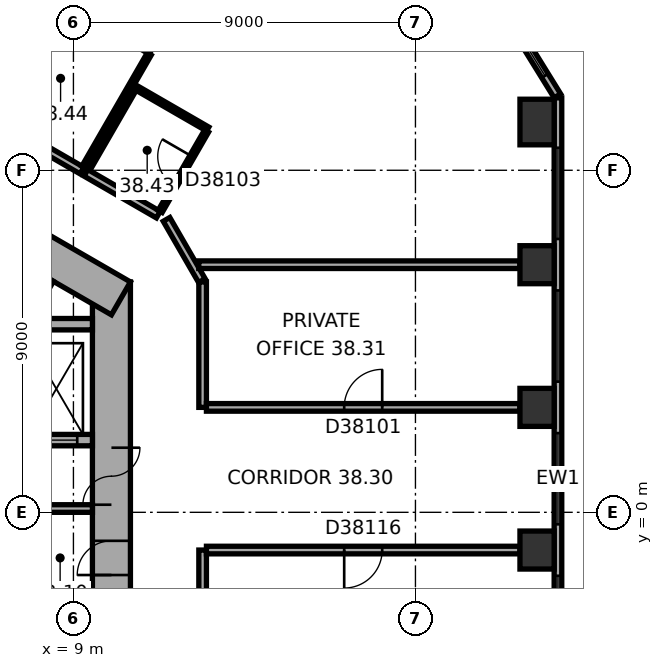
"""IFC4 building model, lengths in metres.
Left out: names, types, materials, properties, quantities, classifications, styles, units other than length and angle.
Written with IfcOpenShell. Run it as: python <this file> out.ifc"""

import sys

from ifc_helpers import new_model, si_unit, direction, frame, frame_2d, origin, origin_2d, place, context, subcontext, project, spatial, rectangle, extrude, element, fill, save


model = new_model("IFC4")
c1 = context("Model", 3, precision=1e-05, world=origin(), true_north=direction((0.0, 1.0)))
c2 = subcontext(c1, "Body", "Model", "MODEL_VIEW")
j1 = project(units=[si_unit("LENGTHUNIT", "METRE"), si_unit("PLANEANGLEUNIT", "RADIAN")], contexts=[c1])
p1 = place(None, origin())
s1 = spatial("IfcSite", under=j1, at=p1, CompositionType="ELEMENT")
p2 = place(p1, origin())
s2 = spatial("IfcBuilding", under=s1, at=p2, CompositionType="ELEMENT")
p3 = place(p2, frame((0.0, 0.0, 157.7)))
s3 = spatial("IfcBuildingStorey", under=s2, at=p3, CompositionType="ELEMENT", Elevation=157.7)
for number, where, z_axis, x_axis in (
    (1, (21.2, -0.993, 0.0), (0.0, 0.0, 1.0), (0.0, 1.0, 0.0)),
    (2, (21.2, 2.761, 0.0), (0.0, 0.0, 1.0), (0.0, 1.0, 0.0)),
    (3, (21.2, 6.515, 0.0), (0.0, 0.0, 1.0), (0.0, 1.0, 0.0)),
):
    element("IfcColumn", number, at=place(p3, frame(where, z_axis=z_axis, x_axis=x_axis)), inside=s3, PredefinedType="COLUMN", context=c2, shape_type="SweptSolid", body=[
        extrude(rectangle(XDim=1.0, YDim=0.9, at=origin_2d()), origin(), (0.0, 0.0, 1.0), 3.7),
    ])
p4 = place(p3, frame((21.2, 10.27, 0.0), z_axis=(0.0, 0.0, 1.0), x_axis=(0.0, 1.0, 0.0)))
e4 = element("IfcColumn", 4, at=p4, inside=s3, PredefinedType="COLUMN", context=c2, shape_type="SweptSolid", body=[
    extrude(rectangle(XDim=1.2, YDim=0.9, at=origin_2d()), origin(), (0.0, 0.0, 1.0), 3.7),
])
p5 = place(p3, frame((10.0, -6.062, 0.0), z_axis=(0.0, 0.0, 1.0), x_axis=(0.0, 1.0, 0.0)))
e5 = element("IfcWall", 5, at=p5, inside=s3, PredefinedType="SHEAR", context=c2, shape_type="SweptSolid", body=[
    extrude(rectangle(XDim=12.125, YDim=1.0, at=frame_2d((6.062, 0.0))), origin(), (0.0, 0.0, 1.0), 3.7),
])
p6 = place(p5, frame((6.262, 0.0, 0.0)))
e6 = element("IfcOpeningElement", 6, at=p6, cuts=e5, PredefinedType="OPENING", context=c2, shape_type="SweptSolid", body=[
    extrude(rectangle(XDim=1.5, YDim=2.1, at=frame_2d((0.75, 1.05))), frame((0.0, 0.51, 0.0), z_axis=(0.0, -1.0, 0.0), x_axis=(1.0, 0.0, 0.0)), (0.0, 0.0, 1.0), 1.02),
])
p7 = place(p5, frame((1.812, 0.0, 0.0)))
e7 = element("IfcOpeningElement", 7, at=p7, cuts=e5, PredefinedType="OPENING", context=c2, shape_type="SweptSolid", body=[
    extrude(rectangle(XDim=0.9, YDim=2.1, at=frame_2d((0.45, 1.05))), frame((0.0, 0.51, 0.0), z_axis=(0.0, -1.0, 0.0), x_axis=(1.0, 0.0, 0.0)), (0.0, 0.0, 1.0), 1.02),
])
p8 = place(p5, frame((4.412, 0.0, 0.0)))
e8 = element("IfcOpeningElement", 8, at=p8, cuts=e5, PredefinedType="OPENING", context=c2, shape_type="SweptSolid", body=[
    extrude(rectangle(XDim=0.9, YDim=2.1, at=frame_2d((0.45, 1.05))), frame((0.0, 0.51, 0.0), z_axis=(0.0, -1.0, 0.0), x_axis=(1.0, 0.0, 0.0)), (0.0, 0.0, 1.0), 1.02),
])
p9 = place(p3, frame((10.25, 5.629, 0.0), z_axis=(0.0, 0.0, 1.0), x_axis=(-0.866022616891, 0.50000482701, 0.0)))
e9 = element("IfcWall", 9, at=p9, inside=s3, PredefinedType="SHEAR", context=c2, shape_type="SweptSolid", body=[
    extrude(rectangle(XDim=12.125, YDim=1.0, at=frame_2d((6.062, 0.0))), origin(), (0.0, 0.0, 1.0), 3.7),
])
p10 = place(p9, frame((2.712, 0.0, 0.0)))
e10 = element("IfcOpeningElement", 10, at=p10, cuts=e9, PredefinedType="OPENING", context=c2, shape_type="SweptSolid", body=[
    extrude(rectangle(XDim=0.9, YDim=2.1, at=frame_2d((0.45, 1.05))), frame((0.0, 0.51, 0.0), z_axis=(0.0, -1.0, 0.0), x_axis=(1.0, 0.0, 0.0)), (0.0, 0.0, 1.0), 1.02),
])
p11 = place(p9, frame((6.612, 0.0, 0.0)))
e11 = element("IfcOpeningElement", 11, at=p11, cuts=e9, PredefinedType="OPENING", context=c2, shape_type="SweptSolid", body=[
    extrude(rectangle(XDim=0.9, YDim=2.1, at=frame_2d((0.45, 1.05))), frame((0.0, 0.51, 0.0), z_axis=(0.0, -1.0, 0.0), x_axis=(1.0, 0.0, 0.0)), (0.0, 0.0, 1.0), 1.02),
])
p12 = place(p3, frame((21.75, -9.138, 0.0), z_axis=(0.0, 0.0, 1.0), x_axis=(0.0, 1.0, 0.0)))
e12 = element("IfcWall", 12, at=p12, inside=s3, PredefinedType="STANDARD", context=c2, shape_type="SweptSolid", body=[
    extrude(rectangle(XDim=20.044, YDim=0.2, at=frame_2d((10.022, 0.0))), origin(), (0.0, 0.0, 1.0), 3.7),
])
p13 = place(p12, frame((1.314, 0.0, 0.9)))
e13 = element("IfcOpeningElement", 13, at=p13, cuts=e12, PredefinedType="OPENING", context=c2, shape_type="SweptSolid", body=[
    extrude(rectangle(XDim=2.4, YDim=2.0, at=frame_2d((1.2, 1.0))), frame((0.0, 0.11, 0.0), z_axis=(0.0, -1.0, 0.0), x_axis=(1.0, 0.0, 0.0)), (0.0, 0.0, 1.0), 0.22),
])
p14 = place(p12, frame((5.069, 0.0, 0.9)))
e14 = element("IfcOpeningElement", 14, at=p14, cuts=e12, PredefinedType="OPENING", context=c2, shape_type="SweptSolid", body=[
    extrude(rectangle(XDim=2.4, YDim=2.0, at=frame_2d((1.2, 1.0))), frame((0.0, 0.11, 0.0), z_axis=(0.0, -1.0, 0.0), x_axis=(1.0, 0.0, 0.0)), (0.0, 0.0, 1.0), 0.22),
])
p15 = place(p12, frame((8.823, 0.0, 0.9)))
e15 = element("IfcOpeningElement", 15, at=p15, cuts=e12, PredefinedType="OPENING", context=c2, shape_type="SweptSolid", body=[
    extrude(rectangle(XDim=2.4, YDim=2.0, at=frame_2d((1.2, 1.0))), frame((0.0, 0.11, 0.0), z_axis=(0.0, -1.0, 0.0), x_axis=(1.0, 0.0, 0.0)), (0.0, 0.0, 1.0), 0.22),
])
p16 = place(p12, frame((12.577, 0.0, 0.9)))
e16 = element("IfcOpeningElement", 16, at=p16, cuts=e12, PredefinedType="OPENING", context=c2, shape_type="SweptSolid", body=[
    extrude(rectangle(XDim=2.4, YDim=2.0, at=frame_2d((1.2, 1.0))), frame((0.0, 0.11, 0.0), z_axis=(0.0, -1.0, 0.0), x_axis=(1.0, 0.0, 0.0)), (0.0, 0.0, 1.0), 0.22),
])
p17 = place(p12, frame((16.331, 0.0, 0.9)))
e17 = element("IfcOpeningElement", 17, at=p17, cuts=e12, PredefinedType="OPENING", context=c2, shape_type="SweptSolid", body=[
    extrude(rectangle(XDim=2.4, YDim=2.0, at=frame_2d((1.2, 1.0))), frame((0.0, 0.11, 0.0), z_axis=(0.0, -1.0, 0.0), x_axis=(1.0, 0.0, 0.0)), (0.0, 0.0, 1.0), 0.22),
])
p18 = place(p3, frame((21.735, 10.958, 0.0), z_axis=(0.0, 0.0, 1.0), x_axis=(-0.526213807775, 0.850352296702, 0.0)))
e18 = element("IfcWall", 18, at=p18, inside=s3, PredefinedType="STANDARD", context=c2, shape_type="SweptSolid", body=[
    extrude(rectangle(XDim=4.238, YDim=0.2, at=frame_2d((2.119, 0.0))), origin(), (0.0, 0.0, 1.0), 3.7),
])
p19 = place(p18, frame((0.619, 0.0, 0.9)))
e19 = element("IfcOpeningElement", 19, at=p19, cuts=e18, PredefinedType="OPENING", context=c2, shape_type="SweptSolid", body=[
    extrude(rectangle(XDim=3.0, YDim=2.0, at=frame_2d((1.5, 1.0))), frame((0.0, 0.11, 0.0), z_axis=(0.0, -1.0, 0.0), x_axis=(1.0, 0.0, 0.0)), (0.0, 0.0, 1.0), 0.22),
])
for number, where, z_axis, x_axis in (
    (20, (7.3, 0.1, 0.0), (0.0, 0.0, 1.0), (1.0, 0.0, 0.0)),
    (21, (7.287, 4.222, 0.0), (0.0, 0.0, 1.0), (0.5, 0.866, 0.0)),
):
    element("IfcWall", number, at=place(p3, frame(where, z_axis=z_axis, x_axis=x_axis)), inside=s3, PredefinedType="PARTITIONING", context=c2, shape_type="SweptSolid", body=[
        extrude(rectangle(XDim=2.2, YDim=0.2, at=frame_2d((1.1, 0.0))), origin(), (0.0, 0.0, 1.0), 3.42),
    ])
p20 = place(p3, frame((7.3, 1.9, 0.0), z_axis=(0.0, 0.0, 1.0), x_axis=(1.0, 0.0, 0.0)))
e22 = element("IfcWall", 22, at=p20, inside=s3, PredefinedType="SHEAR", context=c2, shape_type="SweptSolid", body=[
    extrude(rectangle(XDim=2.2, YDim=0.3, at=frame_2d((1.1, 0.0))), origin(), (0.0, 0.0, 1.0), 3.42),
])
p21 = place(p20, frame((0.7, 0.0, 0.0)))
e23 = element("IfcOpeningElement", 23, at=p21, cuts=e22, PredefinedType="OPENING", context=c2, shape_type="SweptSolid", body=[
    extrude(rectangle(XDim=1.1, YDim=2.1, at=frame_2d((0.55, 1.05))), frame((0.0, 0.16, 0.0), z_axis=(0.0, -1.0, 0.0), x_axis=(1.0, 0.0, 0.0)), (0.0, 0.0, 1.0), 0.32),
])
p22 = place(p3, frame((7.3, 4.95, 0.0), z_axis=(0.0, 0.0, 1.0), x_axis=(1.0, 0.0, 0.0)))
e24 = element("IfcWall", 24, at=p22, inside=s3, PredefinedType="SHEAR", context=c2, shape_type="SweptSolid", body=[
    extrude(rectangle(XDim=2.2, YDim=0.3, at=frame_2d((1.1, 0.0))), origin(), (0.0, 0.0, 1.0), 3.42),
])
p23 = place(p3, frame((8.132, 13.78, 0.0), z_axis=(0.0, 0.0, 1.0), x_axis=(0.866039519639, -0.499975549825, 0.0)))
e25 = element("IfcWall", 25, at=p23, inside=s3, PredefinedType="PARTITIONING", context=c2, shape_type="SweptSolid", body=[
    extrude(rectangle(XDim=3.34, YDim=0.12, at=frame_2d((1.67, 0.0))), origin(), (0.0, 0.0, 1.0), 3.42),
])
p24 = place(p3, frame((8.37, 19.013, 0.0), z_axis=(0.0, 0.0, 1.0), x_axis=(-0.446183598632, -0.894941448538, 0.0)))
e26 = element("IfcWall", 26, at=p24, inside=s3, PredefinedType="PARTITIONING", context=c2, shape_type="SweptSolid", body=[
    extrude(rectangle(XDim=8.156, YDim=0.2, at=frame_2d((4.078, 0.0))), origin(), (0.0, 0.0, 1.0), 3.42),
])
p25 = place(p3, frame((9.224, 8.993, 0.0), z_axis=(0.0, 0.0, 1.0), x_axis=(-0.866031754707, 0.499988999718, 0.0)))
e27 = element("IfcWall", 27, at=p25, inside=s3, PredefinedType="PARTITIONING", context=c2, shape_type="SweptSolid", body=[
    extrude(rectangle(XDim=9.514, YDim=0.2, at=frame_2d((4.757, 0.0))), origin(), (0.0, 0.0, 1.0), 3.42),
])
p26 = place(p25, frame((3.848, 0.0, 0.0)))
e28 = element("IfcOpeningElement", 28, at=p26, cuts=e27, PredefinedType="OPENING", context=c2, shape_type="SweptSolid", body=[
    extrude(rectangle(XDim=1.0, YDim=2.1, at=frame_2d((0.5, 1.05))), frame((0.0, 0.11, 0.0), z_axis=(0.0, -1.0, 0.0), x_axis=(1.0, 0.0, 0.0)), (0.0, 0.0, 1.0), 0.22),
])
p27 = place(p3, frame((9.378, 9.019, 0.0), z_axis=(0.0, 0.0, 1.0), x_axis=(0.500004234368, 0.866022959057, 0.0)))
e29 = element("IfcWall", 29, at=p27, inside=s3, PredefinedType="PARTITIONING", context=c2, shape_type="SweptSolid", body=[
    extrude(rectangle(XDim=2.5, YDim=0.12, at=frame_2d((1.25, 0.0))), origin(), (0.0, 0.0, 1.0), 3.42),
])
p28 = place(p3, frame((10.68, 11.154, 0.0), z_axis=(0.0, 0.0, 1.0), x_axis=(0.86600889856, -0.500028586798, 0.0)))
e30 = element("IfcWall", 30, at=p28, inside=s3, PredefinedType="PARTITIONING", context=c2, shape_type="SweptSolid", body=[
    extrude(rectangle(XDim=2.14, YDim=0.12, at=frame_2d((1.07, 0.0))), origin(), (0.0, 0.0, 1.0), 3.42),
])
p29 = place(p3, frame((10.994, 12.058, 0.0), z_axis=(0.0, 0.0, 1.0), x_axis=(-0.500009156386, -0.866020117278, 0.0)))
e31 = element("IfcWall", 31, at=p29, inside=s3, PredefinedType="PARTITIONING", context=c2, shape_type="SweptSolid", body=[
    extrude(rectangle(XDim=3.44, YDim=0.12, at=frame_2d((1.72, 0.0))), origin(), (0.0, 0.0, 1.0), 3.42),
])
p30 = place(p3, frame((11.233, 7.833, 0.0), z_axis=(0.0, 0.0, 1.0), x_axis=(-0.866008176907, 0.50002983664, 0.0)))
e32 = element("IfcWall", 32, at=p30, inside=s3, PredefinedType="PARTITIONING", context=c2, shape_type="SweptSolid", body=[
    extrude(rectangle(XDim=2.2, YDim=0.2, at=frame_2d((1.1, 0.0))), origin(), (0.0, 0.0, 1.0), 3.42),
])
p31 = place(p3, frame((12.38, 6.097, 0.0), z_axis=(0.0, 0.0, 1.0), x_axis=(-0.499964847546, 0.866045698112, 0.0)))
e33 = element("IfcWall", 33, at=p31, inside=s3, PredefinedType="PARTITIONING", context=c2, shape_type="SweptSolid", body=[
    extrude(rectangle(XDim=1.86, YDim=0.2, at=frame_2d((0.93, 0.0))), origin(), (0.0, 0.0, 1.0), 3.42),
])
p32 = place(p3, frame((12.4, -6.022, 0.0), z_axis=(0.0, 0.0, 1.0), x_axis=(0.0, 1.0, 0.0)))
e34 = element("IfcWall", 34, at=p32, inside=s3, PredefinedType="PARTITIONING", context=c2, shape_type="SweptSolid", body=[
    extrude(rectangle(XDim=5.029, YDim=0.2, at=frame_2d((2.515, 0.0))), origin(), (0.0, 0.0, 1.0), 3.42),
])
p33 = place(p3, frame((12.4, 2.761, 0.0), z_axis=(0.0, 0.0, 1.0), x_axis=(0.0, 1.0, 0.0)))
e35 = element("IfcWall", 35, at=p33, inside=s3, PredefinedType="PARTITIONING", context=c2, shape_type="SweptSolid", body=[
    extrude(rectangle(XDim=3.301, YDim=0.2, at=frame_2d((1.65, 0.0))), origin(), (0.0, 0.0, 1.0), 3.42),
])
p34 = place(p3, frame((12.5, -0.993, 0.0), z_axis=(0.0, 0.0, 1.0), x_axis=(1.0, 0.0, 0.0)))
e36 = element("IfcWall", 36, at=p34, inside=s3, PredefinedType="PARTITIONING", context=c2, shape_type="SweptSolid", body=[
    extrude(rectangle(XDim=8.25, YDim=0.2, at=frame_2d((4.125, 0.0))), origin(), (0.0, 0.0, 1.0), 2.87),
])
p35 = place(p34, frame((3.625, 0.0, 0.0)))
e37 = element("IfcOpeningElement", 37, at=p35, cuts=e36, PredefinedType="OPENING", context=c2, shape_type="SweptSolid", body=[
    extrude(rectangle(XDim=1.0, YDim=2.1, at=frame_2d((0.5, 1.05))), frame((0.0, 0.11, 0.0), z_axis=(0.0, -1.0, 0.0), x_axis=(1.0, 0.0, 0.0)), (0.0, 0.0, 1.0), 0.22),
])
p36 = place(p3, frame((12.503, 10.032, 0.0), z_axis=(0.0, 0.0, 1.0), x_axis=(-0.500002508028, -0.866023955769, 0.0)))
e38 = element("IfcWall", 38, at=p36, inside=s3, PredefinedType="PARTITIONING", context=c2, shape_type="SweptSolid", body=[
    extrude(rectangle(XDim=2.44, YDim=0.12, at=frame_2d((1.22, 0.0))), origin(), (0.0, 0.0, 1.0), 3.42),
])
p37 = place(p36, frame((0.77, 0.0, 0.0)))
e39 = element("IfcOpeningElement", 39, at=p37, cuts=e38, PredefinedType="OPENING", context=c2, shape_type="SweptSolid", body=[
    extrude(rectangle(XDim=0.9, YDim=2.1, at=frame_2d((0.45, 1.05))), frame((0.0, 0.07, 0.0), z_axis=(0.0, -1.0, 0.0), x_axis=(1.0, 0.0, 0.0)), (0.0, 0.0, 1.0), 0.14),
])
p38 = place(p3, frame((20.75, 2.761, 0.0), z_axis=(0.0, 0.0, 1.0), x_axis=(-1.0, 0.0, 0.0)))
e40 = element("IfcWall", 40, at=p38, inside=s3, PredefinedType="PARTITIONING", context=c2, shape_type="SweptSolid", body=[
    extrude(rectangle(XDim=8.25, YDim=0.2, at=frame_2d((4.125, 0.0))), origin(), (0.0, 0.0, 1.0), 3.42),
])
p39 = place(p38, frame((3.625, 0.0, 0.0)))
e41 = element("IfcOpeningElement", 41, at=p39, cuts=e40, PredefinedType="OPENING", context=c2, shape_type="SweptSolid", body=[
    extrude(rectangle(XDim=1.0, YDim=2.1, at=frame_2d((0.5, 1.05))), frame((0.0, 0.11, 0.0), z_axis=(0.0, -1.0, 0.0), x_axis=(1.0, 0.0, 0.0)), (0.0, 0.0, 1.0), 0.22),
])
p40 = place(p3, frame((20.75, 6.515, 0.0), z_axis=(0.0, 0.0, 1.0), x_axis=(-1.0, 0.0, 0.0)))
e42 = element("IfcWall", 42, at=p40, inside=s3, PredefinedType="PARTITIONING", context=c2, shape_type="SweptSolid", body=[
    extrude(rectangle(XDim=8.452, YDim=0.2, at=frame_2d((4.226, 0.0))), origin(), (0.0, 0.0, 1.0), 3.42),
])
p41 = place(p14, origin())
e43 = element("IfcWindow", 43, at=p41, inside=s3, PartitioningType="SINGLE_PANEL", PredefinedType="WINDOW", context=c2, shape_type="SweptSolid", body=[
    extrude(rectangle(XDim=2.4, YDim=2.0, at=frame_2d((1.2, 1.0))), frame((0.0, 0.03, 0.0), z_axis=(0.0, -1.0, 0.0), x_axis=(1.0, 0.0, 0.0)), (0.0, 0.0, 1.0), 0.06),
])
fill(e14, e43)
p42 = place(p15, origin())
e44 = element("IfcWindow", 44, at=p42, inside=s3, PartitioningType="SINGLE_PANEL", PredefinedType="WINDOW", context=c2, shape_type="SweptSolid", body=[
    extrude(rectangle(XDim=2.4, YDim=2.0, at=frame_2d((1.2, 1.0))), frame((0.0, 0.03, 0.0), z_axis=(0.0, -1.0, 0.0), x_axis=(1.0, 0.0, 0.0)), (0.0, 0.0, 1.0), 0.06),
])
fill(e15, e44)
p43 = place(p16, origin())
e45 = element("IfcWindow", 45, at=p43, inside=s3, PartitioningType="SINGLE_PANEL", PredefinedType="WINDOW", context=c2, shape_type="SweptSolid", body=[
    extrude(rectangle(XDim=2.4, YDim=2.0, at=frame_2d((1.2, 1.0))), frame((0.0, 0.03, 0.0), z_axis=(0.0, -1.0, 0.0), x_axis=(1.0, 0.0, 0.0)), (0.0, 0.0, 1.0), 0.06),
])
fill(e16, e45)
p44 = place(p17, origin())
e46 = element("IfcWindow", 46, at=p44, inside=s3, PartitioningType="SINGLE_PANEL", PredefinedType="WINDOW", context=c2, shape_type="SweptSolid", body=[
    extrude(rectangle(XDim=2.4, YDim=2.0, at=frame_2d((1.2, 1.0))), frame((0.0, 0.03, 0.0), z_axis=(0.0, -1.0, 0.0), x_axis=(1.0, 0.0, 0.0)), (0.0, 0.0, 1.0), 0.06),
])
fill(e17, e46)
p45 = place(p19, origin())
e47 = element("IfcWindow", 47, at=p45, inside=s3, PartitioningType="SINGLE_PANEL", PredefinedType="WINDOW", context=c2, shape_type="SweptSolid", body=[
    extrude(rectangle(XDim=3.0, YDim=2.0, at=frame_2d((1.5, 1.0))), frame((0.0, 0.03, 0.0), z_axis=(0.0, -1.0, 0.0), x_axis=(1.0, 0.0, 0.0)), (0.0, 0.0, 1.0), 0.06),
])
fill(e19, e47)
p46 = place(p6, origin())
e48 = element("IfcDoor", 48, at=p46, inside=s3, OperationType="DOUBLE_DOOR_SINGLE_SWING", PredefinedType="DOOR", context=c2, shape_type="SweptSolid", body=[
    extrude(rectangle(XDim=1.5, YDim=2.1, at=frame_2d((0.75, 1.05))), frame((0.0, 0.025, 0.0), z_axis=(0.0, -1.0, 0.0), x_axis=(1.0, 0.0, 0.0)), (0.0, 0.0, 1.0), 0.05),
])
fill(e6, e48)
p47 = place(p8, origin())
e49 = element("IfcDoor", 49, at=p47, inside=s3, OperationType="SINGLE_SWING_LEFT", PredefinedType="DOOR", context=c2, shape_type="SweptSolid", body=[
    extrude(rectangle(XDim=0.9, YDim=2.1, at=frame_2d((0.45, 1.05))), frame((0.0, 0.025, 0.0), z_axis=(0.0, -1.0, 0.0), x_axis=(1.0, 0.0, 0.0)), (0.0, 0.0, 1.0), 0.05),
])
fill(e8, e49)
p48 = place(p21, origin())
e50 = element("IfcDoor", 50, at=p48, inside=s3, OperationType="DOUBLE_DOOR_SLIDING", PredefinedType="DOOR", context=c2, shape_type="SweptSolid", body=[
    extrude(rectangle(XDim=1.1, YDim=2.1, at=frame_2d((0.55, 1.05))), frame((0.0, 0.025, 0.0), z_axis=(0.0, -1.0, 0.0), x_axis=(1.0, 0.0, 0.0)), (0.0, 0.0, 1.0), 0.05),
])
fill(e23, e50)
p49 = place(p39, origin())
e51 = element("IfcDoor", 51, at=p49, inside=s3, OperationType="SINGLE_SWING_LEFT", PredefinedType="DOOR", context=c2, shape_type="SweptSolid", body=[
    extrude(rectangle(XDim=1.0, YDim=2.1, at=frame_2d((0.5, 1.05))), frame((0.0, 0.025, 0.0), z_axis=(0.0, -1.0, 0.0), x_axis=(1.0, 0.0, 0.0)), (0.0, 0.0, 1.0), 0.05),
])
fill(e41, e51)
p50 = place(p37, origin())
e52 = element("IfcDoor", 52, at=p50, inside=s3, OperationType="SINGLE_SWING_LEFT", PredefinedType="DOOR", context=c2, shape_type="SweptSolid", body=[
    extrude(rectangle(XDim=0.9, YDim=2.1, at=frame_2d((0.45, 1.05))), frame((0.0, 0.025, 0.0), z_axis=(0.0, -1.0, 0.0), x_axis=(1.0, 0.0, 0.0)), (0.0, 0.0, 1.0), 0.05),
])
fill(e39, e52)
p51 = place(p35, origin())
e53 = element("IfcDoor", 53, at=p51, inside=s3, OperationType="SINGLE_SWING_LEFT", PredefinedType="DOOR", context=c2, shape_type="SweptSolid", body=[
    extrude(rectangle(XDim=1.0, YDim=2.1, at=frame_2d((0.5, 1.05))), frame((0.0, 0.025, 0.0), z_axis=(0.0, -1.0, 0.0), x_axis=(1.0, 0.0, 0.0)), (0.0, 0.0, 1.0), 0.05),
])
fill(e37, e53)
save(model, sys.argv[1])
